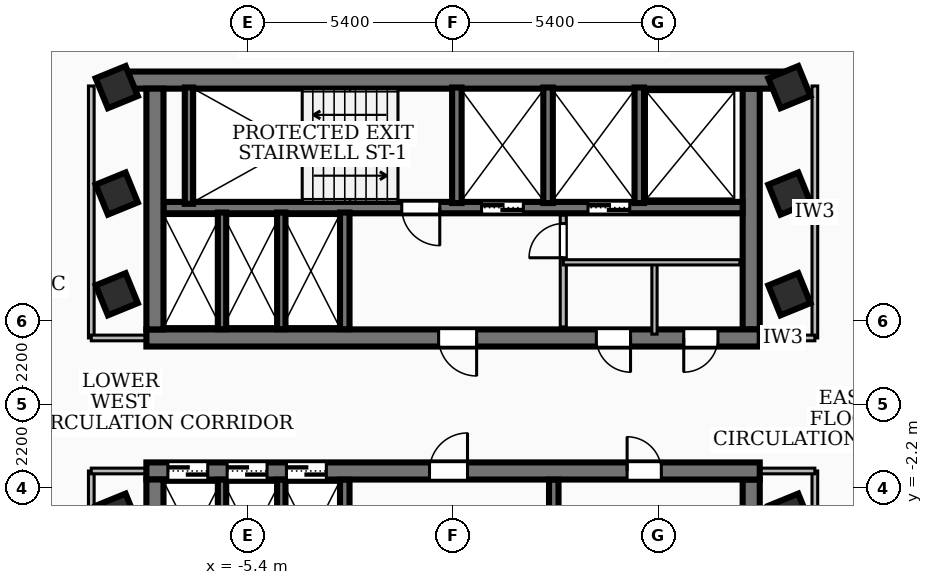
"""IFC4 building model, lengths in metres.
Left out: names, types, materials, properties, quantities, classifications, styles, units other than length and angle.
Written with IfcOpenShell. Run it as: python <this file> out.ifc"""

import sys

from ifc_helpers import new_model, si_unit, direction, frame, frame_2d, origin, origin_2d, place, context, subcontext, project, spatial, rectangle, extrude, element, fill, save


model = new_model("IFC4")
c1 = context("Model", 3, precision=1e-05, world=origin(), true_north=direction((0.0, 1.0)))
c2 = subcontext(c1, "Body", "Model", "MODEL_VIEW")
j1 = project(units=[si_unit("LENGTHUNIT", "METRE"), si_unit("PLANEANGLEUNIT", "RADIAN")], contexts=[c1])
p1 = place(None, origin())
s1 = spatial("IfcSite", under=j1, at=p1, CompositionType="ELEMENT")
p2 = place(p1, origin())
s2 = spatial("IfcBuilding", under=s1, at=p2, CompositionType="ELEMENT")
p3 = place(p2, frame((0.0, 0.0, 173.88)))
s3 = spatial("IfcBuildingStorey", under=s2, at=p3, CompositionType="ELEMENT", Elevation=173.88)
p4 = place(p3, frame((-8.78, 8.535, 0.0), z_axis=(0.0, 0.0, 1.0), x_axis=(1.0, 0.0, 0.0)))
e1 = element("IfcWall", 1, at=p4, inside=s3, PredefinedType="SHEAR", context=c2, shape_type="SweptSolid", body=[
    extrude(rectangle(XDim=17.56, YDim=0.45, at=frame_2d((8.78, 0.0))), origin(), (0.0, 0.0, 1.0), 3.34),
])
p5 = place(p3, frame((8.07, 1.75, 0.0), z_axis=(0.0, 0.0, 1.0), x_axis=(-1.0, 0.0, 0.0)))
e2 = element("IfcWall", 2, at=p5, inside=s3, PredefinedType="SHEAR", context=c2, shape_type="SweptSolid", body=[
    extrude(rectangle(XDim=16.14, YDim=0.45, at=frame_2d((8.07, 0.0))), origin(), (0.0, 0.0, 1.0), 3.34),
])
p6 = place(p5, frame((7.45, 0.0, 0.0)))
e3 = element("IfcOpeningElement", 3, at=p6, cuts=e2, PredefinedType="OPENING", context=c2, shape_type="SweptSolid", body=[
    extrude(rectangle(XDim=1.0, YDim=2.1, at=frame_2d((0.5, 1.05))), frame((0.0, 0.235, 0.0), z_axis=(0.0, -1.0, 0.0), x_axis=(1.0, 0.0, 0.0)), (0.0, 0.0, 1.0), 0.47),
])
p7 = place(p5, frame((3.4, 0.0, 0.0)))
e4 = element("IfcOpeningElement", 4, at=p7, cuts=e2, PredefinedType="OPENING", context=c2, shape_type="SweptSolid", body=[
    extrude(rectangle(XDim=0.9, YDim=2.06, at=frame_2d((0.45, 1.03))), frame((0.0, 0.235, 0.0), z_axis=(0.0, -1.0, 0.0), x_axis=(1.0, 0.0, 0.0)), (0.0, 0.0, 1.0), 0.47),
])
p8 = place(p5, frame((1.1, 0.0, 0.0)))
e5 = element("IfcOpeningElement", 5, at=p8, cuts=e2, PredefinedType="OPENING", context=c2, shape_type="SweptSolid", body=[
    extrude(rectangle(XDim=0.9, YDim=2.06, at=frame_2d((0.45, 1.03))), frame((0.0, 0.235, 0.0), z_axis=(0.0, -1.0, 0.0), x_axis=(1.0, 0.0, 0.0)), (0.0, 0.0, 1.0), 0.47),
])
for number, where, z_axis, x_axis in (
    (6, (-7.845, 1.975, 0.0), (0.0, 0.0, 1.0), (0.0, 1.0, 0.0)),
    (7, (7.845, 8.31, 0.0), (0.0, 0.0, 1.0), (0.0, -1.0, 0.0)),
):
    element("IfcWall", number, at=place(p3, frame(where, z_axis=z_axis, x_axis=x_axis)), inside=s3, PredefinedType="SHEAR", context=c2, shape_type="SweptSolid", body=[
        extrude(rectangle(XDim=6.335, YDim=0.45, at=frame_2d((3.167, 0.0))), origin(), (0.0, 0.0, 1.0), 3.34),
    ])
p9 = place(p3, frame((7.62, 5.18, 0.0), z_axis=(0.0, 0.0, 1.0), x_axis=(-1.0, 0.0, 0.0)))
e8 = element("IfcWall", 8, at=p9, inside=s3, PredefinedType="SOLIDWALL", context=c2, shape_type="SweptSolid", body=[
    extrude(rectangle(XDim=15.24, YDim=0.3, at=frame_2d((7.62, 0.0))), origin(), (0.0, 0.0, 1.0), 3.34),
])
p10 = place(p9, frame((5.77, 0.0, 0.0)))
e9 = element("IfcOpeningElement", 9, at=p10, cuts=e8, PredefinedType="OPENING", context=c2, shape_type="SweptSolid", body=[
    extrude(rectangle(XDim=1.1, YDim=2.15, at=frame_2d((0.55, 1.075))), frame((0.0, 0.16, 0.0), z_axis=(0.0, -1.0, 0.0), x_axis=(1.0, 0.0, 0.0)), (0.0, 0.0, 1.0), 0.32),
])
p11 = place(p9, frame((2.97, 0.0, 0.0)))
e10 = element("IfcOpeningElement", 10, at=p11, cuts=e8, PredefinedType="OPENING", context=c2, shape_type="SweptSolid", body=[
    extrude(rectangle(XDim=1.1, YDim=2.15, at=frame_2d((0.55, 1.075))), frame((0.0, 0.16, 0.0), z_axis=(0.0, -1.0, 0.0), x_axis=(1.0, 0.0, 0.0)), (0.0, 0.0, 1.0), 0.32),
])
p12 = place(p9, frame((7.97, 0.0, 0.0)))
e11 = element("IfcOpeningElement", 11, at=p12, cuts=e8, PredefinedType="OPENING", context=c2, shape_type="SweptSolid", body=[
    extrude(rectangle(XDim=1.0, YDim=2.1, at=frame_2d((0.5, 1.05))), frame((0.0, 0.16, 0.0), z_axis=(0.0, -1.0, 0.0), x_axis=(1.0, 0.0, 0.0)), (0.0, 0.0, 1.0), 0.32),
])
p13 = place(p3, frame((-8.07, -1.75, 0.0), z_axis=(0.0, 0.0, 1.0), x_axis=(1.0, 0.0, 0.0)))
e12 = element("IfcWall", 12, at=p13, inside=s3, PredefinedType="SHEAR", context=c2, shape_type="SweptSolid", body=[
    extrude(rectangle(XDim=16.14, YDim=0.45, at=frame_2d((8.07, 0.0))), origin(), (0.0, 0.0, 1.0), 3.34),
])
p14 = place(p13, frame((7.45, 0.0, 0.0)))
e13 = element("IfcOpeningElement", 13, at=p14, cuts=e12, PredefinedType="OPENING", context=c2, shape_type="SweptSolid", body=[
    extrude(rectangle(XDim=1.0, YDim=2.1, at=frame_2d((0.5, 1.05))), frame((0.0, 0.235, 0.0), z_axis=(0.0, -1.0, 0.0), x_axis=(1.0, 0.0, 0.0)), (0.0, 0.0, 1.0), 0.47),
])
p15 = place(p13, frame((12.65, 0.0, 0.0)))
e14 = element("IfcOpeningElement", 14, at=p15, cuts=e12, PredefinedType="OPENING", context=c2, shape_type="SweptSolid", body=[
    extrude(rectangle(XDim=0.9, YDim=2.06, at=frame_2d((0.45, 1.03))), frame((0.0, 0.235, 0.0), z_axis=(0.0, -1.0, 0.0), x_axis=(1.0, 0.0, 0.0)), (0.0, 0.0, 1.0), 0.47),
])
p16 = place(p13, frame((0.565, 0.0, 0.0)))
e15 = element("IfcOpeningElement", 15, at=p16, cuts=e12, PredefinedType="OPENING", context=c2, shape_type="SweptSolid", body=[
    extrude(rectangle(XDim=1.05, YDim=2.15, at=frame_2d((0.525, 1.075))), frame((0.0, 0.235, 0.0), z_axis=(0.0, -1.0, 0.0), x_axis=(1.0, 0.0, 0.0)), (0.0, 0.0, 1.0), 0.47),
])
p17 = place(p13, frame((2.125, 0.0, 0.0)))
e16 = element("IfcOpeningElement", 16, at=p17, cuts=e12, PredefinedType="OPENING", context=c2, shape_type="SweptSolid", body=[
    extrude(rectangle(XDim=1.05, YDim=2.15, at=frame_2d((0.525, 1.075))), frame((0.0, 0.235, 0.0), z_axis=(0.0, -1.0, 0.0), x_axis=(1.0, 0.0, 0.0)), (0.0, 0.0, 1.0), 0.47),
])
p18 = place(p13, frame((3.685, 0.0, 0.0)))
e17 = element("IfcOpeningElement", 17, at=p18, cuts=e12, PredefinedType="OPENING", context=c2, shape_type="SweptSolid", body=[
    extrude(rectangle(XDim=1.05, YDim=2.15, at=frame_2d((0.525, 1.075))), frame((0.0, 0.235, 0.0), z_axis=(0.0, -1.0, 0.0), x_axis=(1.0, 0.0, 0.0)), (0.0, 0.0, 1.0), 0.47),
])
for number, where, z_axis, x_axis in (
    (18, (-7.845, -8.31, 0.0), (0.0, 0.0, 1.0), (0.0, 1.0, 0.0)),
    (19, (7.845, -1.975, 0.0), (0.0, 0.0, 1.0), (0.0, -1.0, 0.0)),
):
    element("IfcWall", number, at=place(p3, frame(where, z_axis=z_axis, x_axis=x_axis)), inside=s3, PredefinedType="SHEAR", context=c2, shape_type="SweptSolid", body=[
        extrude(rectangle(XDim=6.335, YDim=0.45, at=frame_2d((3.167, 0.0))), origin(), (0.0, 0.0, 1.0), 3.34),
    ])
p19 = place(p3, frame((-6.95, 5.28, 0.0), z_axis=(0.0, 0.0, 1.0), x_axis=(0.0, 1.0, 0.0)))
e20 = element("IfcWall", 20, at=p19, inside=s3, PredefinedType="SOLIDWALL", context=c2, shape_type="SweptSolid", body=[
    extrude(rectangle(XDim=3.06, YDim=0.22, at=frame_2d((1.53, 0.0))), origin(), (0.0, 0.0, 1.0), 3.34),
])
for number, where, z_axis, x_axis in (
    (21, (0.1, 5.3, 0.0), (0.0, 0.0, 1.0), (0.0, 1.0, 0.0)),
    (22, (2.5, 5.3, 0.0), (0.0, 0.0, 1.0), (0.0, 1.0, 0.0)),
    (23, (4.9, 5.3, 0.0), (0.0, 0.0, 1.0), (0.0, 1.0, 0.0)),
):
    element("IfcWall", number, at=place(p3, frame(where, z_axis=z_axis, x_axis=x_axis)), inside=s3, PredefinedType="SOLIDWALL", context=c2, shape_type="SweptSolid", body=[
        extrude(rectangle(XDim=3.04, YDim=0.25, at=frame_2d((1.52, 0.0))), origin(), (0.0, 0.0, 1.0), 3.34),
    ])
for number, where, z_axis, x_axis in (
    (24, (-2.85, 1.98, 0.0), (0.0, 0.0, 1.0), (0.0, 1.0, 0.0)),
    (25, (-2.85, -5.05, 0.0), (0.0, 0.0, 1.0), (0.0, 1.0, 0.0)),
    (26, (2.65, -5.05, 0.0), (0.0, 0.0, 1.0), (0.0, 1.0, 0.0)),
):
    element("IfcWall", number, at=place(p3, frame(where, z_axis=z_axis, x_axis=x_axis)), inside=s3, PredefinedType="SOLIDWALL", context=c2, shape_type="SweptSolid", body=[
        extrude(rectangle(XDim=3.07, YDim=0.25, at=frame_2d((1.535, 0.0))), origin(), (0.0, 0.0, 1.0), 3.34),
    ])
for number, where, z_axis, x_axis in (
    (27, (-6.08, 1.98, 0.0), (0.0, 0.0, 1.0), (0.0, 1.0, 0.0)),
    (28, (-4.52, 1.98, 0.0), (0.0, 0.0, 1.0), (0.0, 1.0, 0.0)),
    (29, (-6.08, -5.05, 0.0), (0.0, 0.0, 1.0), (0.0, 1.0, 0.0)),
    (30, (-4.52, -5.05, 0.0), (0.0, 0.0, 1.0), (0.0, 1.0, 0.0)),
):
    element("IfcWall", number, at=place(p3, frame(where, z_axis=z_axis, x_axis=x_axis)), inside=s3, PredefinedType="SOLIDWALL", context=c2, shape_type="SweptSolid", body=[
        extrude(rectangle(XDim=3.07, YDim=0.22, at=frame_2d((1.535, 0.0))), origin(), (0.0, 0.0, 1.0), 3.34),
    ])
for number, where, z_axis, x_axis in (
    (31, (-8.85, -2.9, 0.0), (0.0, 0.0, 1.0), (0.926, 0.378, 0.0)),
    (32, (-8.85, 2.9, 0.0), (0.0, 0.0, 1.0), (0.926, 0.378, 0.0)),
    (33, (-8.85, 5.55, 0.0), (0.0, 0.0, 1.0), (0.926, 0.378, 0.0)),
    (34, (8.85, -2.9, 0.0), (0.0, 0.0, 1.0), (0.926, 0.378, 0.0)),
    (35, (8.85, 2.9, 0.0), (0.0, 0.0, 1.0), (0.926, 0.378, 0.0)),
    (36, (8.85, 5.55, 0.0), (0.0, 0.0, 1.0), (0.926, 0.378, 0.0)),
    (37, (-8.85, 8.35, 0.0), (0.0, 0.0, 1.0), (0.926, 0.378, 0.0)),
    (38, (8.85, 8.35, 0.0), (0.0, 0.0, 1.0), (0.926, 0.378, 0.0)),
):
    element("IfcColumn", number, at=place(p3, frame(where, z_axis=z_axis, x_axis=x_axis)), inside=s3, PredefinedType="COLUMN", context=c2, shape_type="SweptSolid", body=[
        extrude(rectangle(XDim=0.85, YDim=0.85, at=origin_2d()), origin(), (0.0, 0.0, 1.0), 3.6),
    ])
p20 = place(p3, frame((2.9, 2.04, 0.0), z_axis=(0.0, 0.0, 1.0), x_axis=(0.0, 1.0, 0.0)))
e39 = element("IfcWall", 39, at=p20, inside=s3, PredefinedType="PARTITIONING", context=c2, shape_type="SweptSolid", body=[
    extrude(rectangle(XDim=2.94, YDim=0.16, at=frame_2d((1.47, 0.0))), origin(), (0.0, 0.0, 1.0), 2.57),
])
p21 = place(p20, frame((1.82, 0.0, 0.0)))
e40 = element("IfcOpeningElement", 40, at=p21, cuts=e39, PredefinedType="OPENING", context=c2, shape_type="SweptSolid", body=[
    extrude(rectangle(XDim=0.9, YDim=2.06, at=frame_2d((0.45, 1.03))), frame((0.0, 0.09, 0.0), z_axis=(0.0, -1.0, 0.0), x_axis=(1.0, 0.0, 0.0)), (0.0, 0.0, 1.0), 0.18),
])
p22 = place(p3, frame((2.9, 3.74, 0.0), z_axis=(0.0, 0.0, 1.0), x_axis=(1.0, 0.0, 0.0)))
e41 = element("IfcWall", 41, at=p22, inside=s3, PredefinedType="PARTITIONING", context=c2, shape_type="SweptSolid", body=[
    extrude(rectangle(XDim=4.65, YDim=0.138, at=frame_2d((2.325, 0.0))), origin(), (0.0, 0.0, 1.0), 3.34),
])
p23 = place(p3, frame((5.3, 1.85, 0.0), z_axis=(0.0, 0.0, 1.0), x_axis=(0.0, 1.0, 0.0)))
e42 = element("IfcWall", 42, at=p23, inside=s3, PredefinedType="PARTITIONING", context=c2, shape_type="SweptSolid", body=[
    extrude(rectangle(XDim=1.89, YDim=0.138, at=frame_2d((0.945, 0.0))), origin(), (0.0, 0.0, 1.0), 2.57),
])
p24 = place(p3, frame((-9.52, 1.75, 0.0), z_axis=(0.0, 0.0, 1.0), x_axis=(0.0, 1.0, 0.0)))
e43 = element("IfcWall", 43, at=p24, inside=s3, PredefinedType="PARTITIONING", context=c2, shape_type="SweptSolid", body=[
    extrude(rectangle(XDim=6.63, YDim=0.15, at=frame_2d((3.315, 0.0))), origin(), (0.0, 0.0, 1.0), 3.34),
])
p25 = place(p3, frame((-7.85, 1.75, 0.0), z_axis=(0.0, 0.0, 1.0), x_axis=(-1.0, 0.0, 0.0)))
e44 = element("IfcWall", 44, at=p25, inside=s3, PredefinedType="PARTITIONING", context=c2, shape_type="SweptSolid", body=[
    extrude(rectangle(XDim=1.67, YDim=0.15, at=frame_2d((0.835, 0.0))), origin(), (0.0, 0.0, 1.0), 2.57),
])
p26 = place(p3, frame((-9.52, -8.38, 0.0), z_axis=(0.0, 0.0, 1.0), x_axis=(0.0, 1.0, 0.0)))
e45 = element("IfcWall", 45, at=p26, inside=s3, PredefinedType="PARTITIONING", context=c2, shape_type="SweptSolid", body=[
    extrude(rectangle(XDim=6.63, YDim=0.15, at=frame_2d((3.315, 0.0))), origin(), (0.0, 0.0, 1.0), 2.644),
])
p27 = place(p3, frame((-7.85, -1.75, 0.0), z_axis=(0.0, 0.0, 1.0), x_axis=(-1.0, 0.0, 0.0)))
e46 = element("IfcWall", 46, at=p27, inside=s3, PredefinedType="PARTITIONING", context=c2, shape_type="SweptSolid", body=[
    extrude(rectangle(XDim=1.67, YDim=0.15, at=frame_2d((0.835, 0.0))), origin(), (0.0, 0.0, 1.0), 2.57),
])
p28 = place(p3, frame((9.52, 1.75, 0.0), z_axis=(0.0, 0.0, 1.0), x_axis=(0.0, 1.0, 0.0)))
e47 = element("IfcWall", 47, at=p28, inside=s3, PredefinedType="PARTITIONING", context=c2, shape_type="SweptSolid", body=[
    extrude(rectangle(XDim=6.63, YDim=0.15, at=frame_2d((3.315, 0.0))), origin(), (0.0, 0.0, 1.0), 2.644),
])
p29 = place(p3, frame((7.85, 1.75, 0.0), z_axis=(0.0, 0.0, 1.0), x_axis=(1.0, 0.0, 0.0)))
e48 = element("IfcWall", 48, at=p29, inside=s3, PredefinedType="PARTITIONING", context=c2, shape_type="SweptSolid", body=[
    extrude(rectangle(XDim=1.67, YDim=0.15, at=frame_2d((0.835, 0.0))), origin(), (0.0, 0.0, 1.0), 2.57),
])
p30 = place(p3, frame((9.52, -8.38, 0.0), z_axis=(0.0, 0.0, 1.0), x_axis=(0.0, 1.0, 0.0)))
e49 = element("IfcWall", 49, at=p30, inside=s3, PredefinedType="PARTITIONING", context=c2, shape_type="SweptSolid", body=[
    extrude(rectangle(XDim=6.63, YDim=0.15, at=frame_2d((3.315, 0.0))), origin(), (0.0, 0.0, 1.0), 3.34),
])
p31 = place(p3, frame((7.85, -1.75, 0.0), z_axis=(0.0, 0.0, 1.0), x_axis=(1.0, 0.0, 0.0)))
e50 = element("IfcWall", 50, at=p31, inside=s3, PredefinedType="PARTITIONING", context=c2, shape_type="SweptSolid", body=[
    extrude(rectangle(XDim=1.67, YDim=0.15, at=frame_2d((0.835, 0.0))), origin(), (0.0, 0.0, 1.0), 2.57),
])
p32 = place(p3, frame((9.323, 14.973, 0.0), z_axis=(0.0, 0.0, 1.0), x_axis=(0.377891753295, -0.92584978414, 0.0)))
e51 = element("IfcWall", 51, at=p32, inside=s3, PredefinedType="PARTITIONING", context=c2, shape_type="SweptSolid", body=[
    extrude(rectangle(XDim=20.361, YDim=0.11, at=frame_2d((10.18, 0.0))), origin(), (0.0, 0.0, 1.0), 2.644),
])
p33 = place(p32, frame((9.741, 0.0, 0.0)))
e52 = element("IfcOpeningElement", 52, at=p33, cuts=e51, PredefinedType="OPENING", context=c2, shape_type="SweptSolid", body=[
    extrude(rectangle(XDim=1.2, YDim=2.1, at=frame_2d((0.6, 1.05))), frame((0.0, 0.065, 0.0), z_axis=(0.0, -1.0, 0.0), x_axis=(1.0, 0.0, 0.0)), (0.0, 0.0, 1.0), 0.13),
])
p34 = place(p3, frame((-14.973, 9.323, 0.0), z_axis=(0.0, 0.0, 1.0), x_axis=(0.92584978414, 0.377891753295, 0.0)))
e53 = element("IfcWall", 53, at=p34, inside=s3, PredefinedType="PARTITIONING", context=c2, shape_type="SweptSolid", body=[
    extrude(rectangle(XDim=20.361, YDim=0.11, at=frame_2d((10.18, 0.0))), origin(), (0.0, 0.0, 1.0), 2.644),
])
p35 = place(p34, frame((9.741, 0.0, 0.0)))
e54 = element("IfcOpeningElement", 54, at=p35, cuts=e53, PredefinedType="OPENING", context=c2, shape_type="SweptSolid", body=[
    extrude(rectangle(XDim=1.2, YDim=2.1, at=frame_2d((0.6, 1.05))), frame((0.0, 0.065, 0.0), z_axis=(0.0, -1.0, 0.0), x_axis=(1.0, 0.0, 0.0)), (0.0, 0.0, 1.0), 0.13),
])
p36 = place(p3, frame((-9.323, -14.973, 0.0), z_axis=(0.0, 0.0, 1.0), x_axis=(-0.377891753295, 0.92584978414, 0.0)))
e55 = element("IfcWall", 55, at=p36, inside=s3, PredefinedType="PARTITIONING", context=c2, shape_type="SweptSolid", body=[
    extrude(rectangle(XDim=20.361, YDim=0.11, at=frame_2d((10.18, 0.0))), origin(), (0.0, 0.0, 1.0), 2.644),
])
p37 = place(p36, frame((9.741, 0.0, 0.0)))
e56 = element("IfcOpeningElement", 56, at=p37, cuts=e55, PredefinedType="OPENING", context=c2, shape_type="SweptSolid", body=[
    extrude(rectangle(XDim=1.2, YDim=2.1, at=frame_2d((0.6, 1.05))), frame((0.0, 0.065, 0.0), z_axis=(0.0, -1.0, 0.0), x_axis=(1.0, 0.0, 0.0)), (0.0, 0.0, 1.0), 0.13),
])
p38 = place(p6, origin())
e57 = element("IfcDoor", 57, at=p38, inside=s3, OperationType="SINGLE_SWING_LEFT", PredefinedType="DOOR", context=c2, shape_type="SweptSolid", body=[
    extrude(rectangle(XDim=1.0, YDim=2.1, at=frame_2d((0.5, 1.05))), frame((0.0, 0.025, 0.0), z_axis=(0.0, -1.0, 0.0), x_axis=(1.0, 0.0, 0.0)), (0.0, 0.0, 1.0), 0.05),
])
fill(e3, e57)
p39 = place(p14, origin())
e58 = element("IfcDoor", 58, at=p39, inside=s3, OperationType="SINGLE_SWING_RIGHT", PredefinedType="DOOR", context=c2, shape_type="SweptSolid", body=[
    extrude(rectangle(XDim=1.0, YDim=2.1, at=frame_2d((0.5, 1.05))), frame((0.0, 0.025, 0.0), z_axis=(0.0, -1.0, 0.0), x_axis=(1.0, 0.0, 0.0)), (0.0, 0.0, 1.0), 0.05),
])
fill(e13, e58)
p40 = place(p10, origin())
e59 = element("IfcDoor", 59, at=p40, inside=s3, OperationType="DOUBLE_DOOR_SLIDING", PredefinedType="DOOR", context=c2, shape_type="SweptSolid", body=[
    extrude(rectangle(XDim=1.1, YDim=2.15, at=frame_2d((0.55, 1.075))), frame((0.0, 0.025, 0.0), z_axis=(0.0, -1.0, 0.0), x_axis=(1.0, 0.0, 0.0)), (0.0, 0.0, 1.0), 0.05),
])
fill(e9, e59)
p41 = place(p11, origin())
e60 = element("IfcDoor", 60, at=p41, inside=s3, OperationType="DOUBLE_DOOR_SLIDING", PredefinedType="DOOR", context=c2, shape_type="SweptSolid", body=[
    extrude(rectangle(XDim=1.1, YDim=2.15, at=frame_2d((0.55, 1.075))), frame((0.0, 0.025, 0.0), z_axis=(0.0, -1.0, 0.0), x_axis=(1.0, 0.0, 0.0)), (0.0, 0.0, 1.0), 0.05),
])
fill(e10, e60)
p42 = place(p12, origin())
e61 = element("IfcDoor", 61, at=p42, inside=s3, OperationType="SINGLE_SWING_LEFT", PredefinedType="DOOR", context=c2, shape_type="SweptSolid", body=[
    extrude(rectangle(XDim=1.0, YDim=2.1, at=frame_2d((0.5, 1.05))), frame((0.0, 0.025, 0.0), z_axis=(0.0, -1.0, 0.0), x_axis=(1.0, 0.0, 0.0)), (0.0, 0.0, 1.0), 0.05),
])
fill(e11, e61)
p43 = place(p15, origin())
e62 = element("IfcDoor", 62, at=p43, inside=s3, OperationType="SINGLE_SWING_LEFT", PredefinedType="DOOR", context=c2, shape_type="SweptSolid", body=[
    extrude(rectangle(XDim=0.9, YDim=2.06, at=frame_2d((0.45, 1.03))), frame((0.0, 0.025, 0.0), z_axis=(0.0, -1.0, 0.0), x_axis=(1.0, 0.0, 0.0)), (0.0, 0.0, 1.0), 0.05),
])
fill(e14, e62)
p44 = place(p16, origin())
e63 = element("IfcDoor", 63, at=p44, inside=s3, OperationType="DOUBLE_DOOR_SLIDING", PredefinedType="DOOR", context=c2, shape_type="SweptSolid", body=[
    extrude(rectangle(XDim=1.05, YDim=2.15, at=frame_2d((0.525, 1.075))), frame((0.0, 0.025, 0.0), z_axis=(0.0, -1.0, 0.0), x_axis=(1.0, 0.0, 0.0)), (0.0, 0.0, 1.0), 0.05),
])
fill(e15, e63)
p45 = place(p17, origin())
e64 = element("IfcDoor", 64, at=p45, inside=s3, OperationType="DOUBLE_DOOR_SLIDING", PredefinedType="DOOR", context=c2, shape_type="SweptSolid", body=[
    extrude(rectangle(XDim=1.05, YDim=2.15, at=frame_2d((0.525, 1.075))), frame((0.0, 0.025, 0.0), z_axis=(0.0, -1.0, 0.0), x_axis=(1.0, 0.0, 0.0)), (0.0, 0.0, 1.0), 0.05),
])
fill(e16, e64)
p46 = place(p18, origin())
e65 = element("IfcDoor", 65, at=p46, inside=s3, OperationType="DOUBLE_DOOR_SLIDING", PredefinedType="DOOR", context=c2, shape_type="SweptSolid", body=[
    extrude(rectangle(XDim=1.05, YDim=2.15, at=frame_2d((0.525, 1.075))), frame((0.0, 0.025, 0.0), z_axis=(0.0, -1.0, 0.0), x_axis=(1.0, 0.0, 0.0)), (0.0, 0.0, 1.0), 0.05),
])
fill(e17, e65)
p47 = place(p7, origin())
e66 = element("IfcDoor", 66, at=p47, inside=s3, OperationType="SINGLE_SWING_LEFT", PredefinedType="DOOR", context=c2, shape_type="SweptSolid", body=[
    extrude(rectangle(XDim=0.9, YDim=2.06, at=frame_2d((0.45, 1.03))), frame((0.0, 0.025, 0.0), z_axis=(0.0, -1.0, 0.0), x_axis=(1.0, 0.0, 0.0)), (0.0, 0.0, 1.0), 0.05),
])
fill(e4, e66)
p48 = place(p8, origin())
e67 = element("IfcDoor", 67, at=p48, inside=s3, OperationType="SINGLE_SWING_RIGHT", PredefinedType="DOOR", context=c2, shape_type="SweptSolid", body=[
    extrude(rectangle(XDim=0.9, YDim=2.06, at=frame_2d((0.45, 1.03))), frame((0.0, 0.025, 0.0), z_axis=(0.0, -1.0, 0.0), x_axis=(1.0, 0.0, 0.0)), (0.0, 0.0, 1.0), 0.05),
])
fill(e5, e67)
p49 = place(p21, origin())
e68 = element("IfcDoor", 68, at=p49, inside=s3, OperationType="SINGLE_SWING_LEFT", PredefinedType="DOOR", context=c2, shape_type="SweptSolid", body=[
    extrude(rectangle(XDim=0.9, YDim=2.06, at=frame_2d((0.45, 1.03))), frame((0.0, 0.025, 0.0), z_axis=(0.0, -1.0, 0.0), x_axis=(1.0, 0.0, 0.0)), (0.0, 0.0, 1.0), 0.05),
])
fill(e40, e68)
save(model, sys.argv[1])
